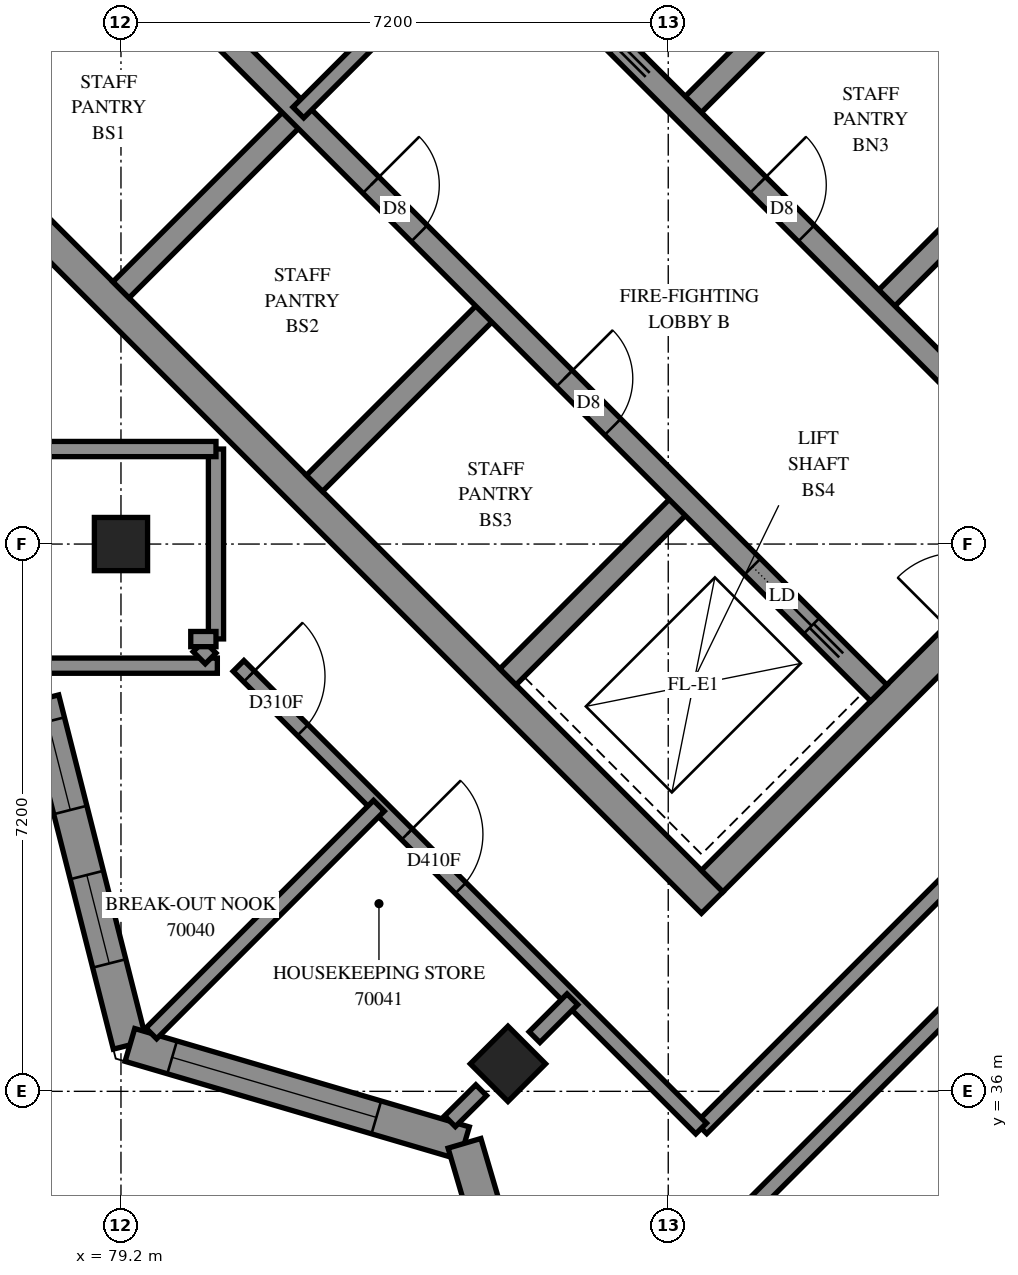
"""IFC4 building model, lengths in metres.
Left out: names, types, materials, properties, quantities, classifications, styles, units other than length and angle.
Written with IfcOpenShell. Run it as: python <this file> out.ifc"""

import sys

from ifc_helpers import new_model, si_unit, direction, frame, frame_2d, origin, origin_2d, place, context, subcontext, project, spatial, polyline, rectangle, outline, extrude, element, fill, save


model = new_model("IFC4")
c1 = context("Model", 3, precision=1e-05, world=origin(), true_north=direction((0.0, 1.0)))
c2 = subcontext(c1, "Body", "Model", "MODEL_VIEW")
j1 = project(units=[si_unit("LENGTHUNIT", "METRE"), si_unit("PLANEANGLEUNIT", "RADIAN")], contexts=[c1])
p1 = place(None, origin())
s1 = spatial("IfcSite", under=j1, at=p1, CompositionType="ELEMENT")
p2 = place(p1, origin())
s2 = spatial("IfcBuilding", under=s1, at=p2, CompositionType="ELEMENT")
p3 = place(p2, frame((0.0, 0.0, 257.4)))
s3 = spatial("IfcBuildingStorey", under=s2, at=p3, CompositionType="ELEMENT", Elevation=257.4)
for number, where, z_axis, x_axis in (
    (1, (79.2, 43.2, 0.0), (0.0, 0.0, 1.0), (1.0, 0.0, 0.0)),
    (2, (84.291, 36.362, 0.0), (0.0, 0.0, 1.0), (0.707, -0.707, 0.0)),
):
    element("IfcColumn", number, at=place(p3, frame(where, z_axis=z_axis, x_axis=x_axis)), inside=s3, PredefinedType="COLUMN", context=c2, shape_type="SweptSolid", body=[
        extrude(rectangle(XDim=0.7, YDim=0.7, at=origin_2d()), origin(), (0.0, 0.0, 1.0), 3.1),
    ])
p4 = place(p3, frame((76.23, 49.231, -0.3), z_axis=(0.0, 0.0, 1.0), x_axis=(0.7071034917, -0.7071100706, 0.0)))
e3 = element("IfcWall", 3, at=p4, inside=s3, PredefinedType="SHEAR", context=c2, shape_type="SweptSolid", body=[
    extrude(rectangle(XDim=15.2, YDim=0.4, at=frame_2d((7.6, 0.0))), origin(), (0.0, 0.0, 1.0), 2.7),
])
p5 = place(p3, frame((86.695, 59.696, -0.3), z_axis=(0.0, 0.0, 1.0), x_axis=(0.7071100706, -0.7071034917, 0.0)))
e4 = element("IfcWall", 4, at=p5, inside=s3, PredefinedType="SHEAR", context=c2, shape_type="SweptSolid", body=[
    extrude(rectangle(XDim=15.2, YDim=0.4, at=frame_2d((7.6, 0.0))), origin(), (0.0, 0.0, 1.0), 2.7),
])
p6 = place(p5, frame((10.4, 0.0, 0.3)))
e5 = element("IfcOpeningElement", 5, at=p6, cuts=e4, PredefinedType="OPENING", context=c2, shape_type="SweptSolid", body=[
    extrude(rectangle(XDim=0.8, YDim=2.1, at=frame_2d((0.4, 1.05))), frame((0.0, 0.21, 0.0), z_axis=(0.0, -1.0, 0.0), x_axis=(1.0, 0.0, 0.0)), (0.0, 0.0, 1.0), 0.42),
])
p7 = place(p3, frame((76.513, 49.231, -0.3), z_axis=(0.0, 0.0, 1.0), x_axis=(0.7071067812, 0.7071067812, 0.0)))
e6 = element("IfcWall", 6, at=p7, inside=s3, PredefinedType="SHEAR", context=c2, shape_type="SweptSolid", body=[
    extrude(rectangle(XDim=14.4, YDim=0.4, at=frame_2d((7.2, 0.0))), origin(), (0.0, 0.0, 1.0), 2.7),
])
p8 = place(p7, frame((4.55, 0.0, 0.3)))
e7 = element("IfcOpeningElement", 7, at=p8, cuts=e6, PredefinedType="OPENING", context=c2, shape_type="SweptSolid", body=[
    extrude(rectangle(XDim=1.1, YDim=2.1, at=frame_2d((0.55, 1.05))), frame((0.0, 0.21, 0.0), z_axis=(0.0, -1.0, 0.0), x_axis=(1.0, 0.0, 0.0)), (0.0, 0.0, 1.0), 0.42),
])
p9 = place(p7, frame((11.35, 0.0, 0.3)))
e8 = element("IfcOpeningElement", 8, at=p9, cuts=e6, PredefinedType="OPENING", context=c2, shape_type="SweptSolid", body=[
    extrude(rectangle(XDim=1.1, YDim=2.1, at=frame_2d((0.55, 1.05))), frame((0.0, 0.21, 0.0), z_axis=(0.0, -1.0, 0.0), x_axis=(1.0, 0.0, 0.0)), (0.0, 0.0, 1.0), 0.42),
])
p10 = place(p3, frame((86.978, 38.766, -0.3), z_axis=(0.0, 0.0, 1.0), x_axis=(0.7071067812, 0.7071067812, 0.0)))
e9 = element("IfcWall", 9, at=p10, inside=s3, PredefinedType="SHEAR", context=c2, shape_type="SweptSolid", body=[
    extrude(rectangle(XDim=14.4, YDim=0.4, at=frame_2d((7.2, 0.0))), origin(), (0.0, 0.0, 1.0), 2.7),
])
p11 = place(p10, frame((4.55, 0.0, 0.3)))
e10 = element("IfcOpeningElement", 10, at=p11, cuts=e9, PredefinedType="OPENING", context=c2, shape_type="SweptSolid", body=[
    extrude(rectangle(XDim=1.1, YDim=2.1, at=frame_2d((0.55, 1.05))), frame((0.0, 0.21, 0.0), z_axis=(0.0, -1.0, 0.0), x_axis=(1.0, 0.0, 0.0)), (0.0, 0.0, 1.0), 0.42),
])
p12 = place(p10, frame((11.35, 0.0, 0.3)))
e11 = element("IfcOpeningElement", 11, at=p12, cuts=e9, PredefinedType="OPENING", context=c2, shape_type="SweptSolid", body=[
    extrude(rectangle(XDim=1.1, YDim=2.1, at=frame_2d((0.55, 1.05))), frame((0.0, 0.21, 0.0), z_axis=(0.0, -1.0, 0.0), x_axis=(1.0, 0.0, 0.0)), (0.0, 0.0, 1.0), 0.42),
])
p13 = place(p3, frame((79.2, 46.544, 0.0), z_axis=(0.0, 0.0, 1.0), x_axis=(0.7071219326, 0.7070916295, 0.0)))
e12 = element("IfcWall", 12, at=p13, inside=s3, PredefinedType="SOLIDWALL", context=c2, shape_type="SweptSolid", body=[
    extrude(rectangle(XDim=3.3, YDim=0.3, at=frame_2d((1.65, 0.0))), origin(), (0.0, 0.0, 1.0), 3.1),
])
p14 = place(p3, frame((81.746, 43.999, 0.0), z_axis=(0.0, 0.0, 1.0), x_axis=(0.7071067812, 0.7071067812, 0.0)))
e13 = element("IfcWall", 13, at=p14, inside=s3, PredefinedType="SOLIDWALL", context=c2, shape_type="SweptSolid", body=[
    extrude(rectangle(XDim=3.3, YDim=0.3, at=frame_2d((1.65, 0.0))), origin(), (0.0, 0.0, 1.0), 3.1),
])
p15 = place(p3, frame((86.625, 48.878, 0.0), z_axis=(0.0, 0.0, 1.0), x_axis=(0.7071067812, 0.7071067812, 0.0)))
e14 = element("IfcWall", 14, at=p15, inside=s3, PredefinedType="SOLIDWALL", context=c2, shape_type="SweptSolid", body=[
    extrude(rectangle(XDim=3.3, YDim=0.3, at=frame_2d((1.65, 0.0))), origin(), (0.0, 0.0, 1.0), 3.1),
])
p16 = place(p3, frame((84.291, 41.453, 0.0), z_axis=(0.0, 0.0, 1.0), x_axis=(0.7071067812, 0.7071067812, 0.0)))
e15 = element("IfcWall", 15, at=p16, inside=s3, PredefinedType="SOLIDWALL", context=c2, shape_type="SweptSolid", body=[
    extrude(rectangle(XDim=3.3, YDim=0.3, at=frame_2d((1.65, 0.0))), origin(), (0.0, 0.0, 1.0), 3.1),
])
p17 = place(p3, frame((89.17, 46.332, 0.0), z_axis=(0.0, 0.0, 1.0), x_axis=(0.7071067812, 0.7071067812, 0.0)))
e16 = element("IfcWall", 16, at=p17, inside=s3, PredefinedType="SOLIDWALL", context=c2, shape_type="SweptSolid", body=[
    extrude(rectangle(XDim=3.3, YDim=0.3, at=frame_2d((1.65, 0.0))), origin(), (0.0, 0.0, 1.0), 3.1),
])
p18 = place(p3, frame((78.988, 51.423, 0.0), z_axis=(0.0, 0.0, 1.0), x_axis=(0.7071067812, -0.7071067812, 0.0)))
e17 = element("IfcWall", 17, at=p18, inside=s3, PredefinedType="SOLIDWALL", context=c2, shape_type="SweptSolid", body=[
    extrude(rectangle(XDim=14.4, YDim=0.3, at=frame_2d((7.2, 0.0))), origin(), (0.0, 0.0, 1.0), 3.1),
])
p19 = place(p18, frame((1.35, 0.0, 0.0)))
e18 = element("IfcOpeningElement", 18, at=p19, cuts=e17, PredefinedType="OPENING", context=c2, shape_type="SweptSolid", body=[
    extrude(rectangle(XDim=0.9, YDim=2.1, at=frame_2d((0.45, 1.05))), frame((0.0, 0.16, 0.0), z_axis=(0.0, -1.0, 0.0), x_axis=(1.0, 0.0, 0.0)), (0.0, 0.0, 1.0), 0.32),
])
p20 = place(p18, frame((4.95, 0.0, 0.0)))
e19 = element("IfcOpeningElement", 19, at=p20, cuts=e17, PredefinedType="OPENING", context=c2, shape_type="SweptSolid", body=[
    extrude(rectangle(XDim=0.9, YDim=2.1, at=frame_2d((0.45, 1.05))), frame((0.0, 0.16, 0.0), z_axis=(0.0, -1.0, 0.0), x_axis=(1.0, 0.0, 0.0)), (0.0, 0.0, 1.0), 0.32),
])
p21 = place(p18, frame((8.55, 0.0, 0.0)))
e20 = element("IfcOpeningElement", 20, at=p21, cuts=e17, PredefinedType="OPENING", context=c2, shape_type="SweptSolid", body=[
    extrude(rectangle(XDim=0.9, YDim=2.1, at=frame_2d((0.45, 1.05))), frame((0.0, 0.16, 0.0), z_axis=(0.0, -1.0, 0.0), x_axis=(1.0, 0.0, 0.0)), (0.0, 0.0, 1.0), 0.32),
])
p22 = place(p18, frame((12.05, 0.0, 0.0)))
e21 = element("IfcOpeningElement", 21, at=p22, cuts=e17, PredefinedType="OPENING", context=c2, shape_type="SweptSolid", body=[
    extrude(rectangle(XDim=1.1, YDim=2.1, at=frame_2d((0.55, 1.05))), frame((0.0, 0.16, 0.0), z_axis=(0.0, -1.0, 0.0), x_axis=(1.0, 0.0, 0.0)), (0.0, 0.0, 1.0), 0.32),
])
p23 = place(p3, frame((81.534, 53.969, 0.0), z_axis=(0.0, 0.0, 1.0), x_axis=(0.707103309, -0.7071102534, 0.0)))
e22 = element("IfcWall", 22, at=p23, inside=s3, PredefinedType="SOLIDWALL", context=c2, shape_type="SweptSolid", body=[
    extrude(rectangle(XDim=14.4, YDim=0.3, at=frame_2d((7.2, 0.0))), origin(), (0.0, 0.0, 1.0), 3.1),
])
p24 = place(p23, frame((8.55, 0.0, 0.0)))
e23 = element("IfcOpeningElement", 23, at=p24, cuts=e22, PredefinedType="OPENING", context=c2, shape_type="SweptSolid", body=[
    extrude(rectangle(XDim=0.9, YDim=2.1, at=frame_2d((0.45, 1.05))), frame((0.0, 0.16, 0.0), z_axis=(0.0, -1.0, 0.0), x_axis=(1.0, 0.0, 0.0)), (0.0, 0.0, 1.0), 0.32),
])
p25 = place(p23, frame((1.25, 0.0, 0.0)))
e24 = element("IfcOpeningElement", 24, at=p25, cuts=e22, PredefinedType="OPENING", context=c2, shape_type="SweptSolid", body=[
    extrude(rectangle(XDim=1.1, YDim=2.1, at=frame_2d((0.55, 1.05))), frame((0.0, 0.16, 0.0), z_axis=(0.0, -1.0, 0.0), x_axis=(1.0, 0.0, 0.0)), (0.0, 0.0, 1.0), 0.32),
])
p26 = place(p23, frame((4.85, 0.0, 0.0)))
e25 = element("IfcOpeningElement", 25, at=p26, cuts=e22, PredefinedType="OPENING", context=c2, shape_type="SweptSolid", body=[
    extrude(rectangle(XDim=1.1, YDim=2.1, at=frame_2d((0.55, 1.05))), frame((0.0, 0.16, 0.0), z_axis=(0.0, -1.0, 0.0), x_axis=(1.0, 0.0, 0.0)), (0.0, 0.0, 1.0), 0.32),
])
p27 = place(p23, frame((12.05, 0.0, 0.0)))
e26 = element("IfcOpeningElement", 26, at=p27, cuts=e22, PredefinedType="OPENING", context=c2, shape_type="SweptSolid", body=[
    extrude(rectangle(XDim=1.1, YDim=2.1, at=frame_2d((0.55, 1.05))), frame((0.0, 0.16, 0.0), z_axis=(0.0, -1.0, 0.0), x_axis=(1.0, 0.0, 0.0)), (0.0, 0.0, 1.0), 0.32),
])
p28 = place(p3, frame((88.958, 51.211, 0.0), z_axis=(0.0, 0.0, 1.0), x_axis=(0.7070998367, -0.7071137256, 0.0)))
e27 = element("IfcWall", 27, at=p28, inside=s3, PredefinedType="SOLIDWALL", context=c2, shape_type="SweptSolid", body=[
    extrude(rectangle(XDim=7.2, YDim=0.3, at=frame_2d((3.6, 0.0))), origin(), (0.0, 0.0, 1.0), 3.1),
])
p29 = place(p3, frame((74.398, 42.229, 0.0), z_axis=(0.0, 0.0, 1.0), x_axis=(0.961995937, -0.2730637604, 0.0)))
e28 = element("IfcWall", 28, at=p29, inside=s3, PredefinedType="SOLIDWALL", context=c2, shape_type="SweptSolid", body=[
    extrude(outline(polyline([(0.045, -0.225), (3.784, -0.225), (4.043, 0.225), (-0.045, 0.225), (0.045, -0.225)])), origin(), (0.0, 0.0, 1.0), 3.1),
])
p30 = place(p3, frame((78.163, 41.16, 0.0), z_axis=(0.0, 0.0, 1.0), x_axis=(0.2459778521, -0.9692754491, 0.0)))
e29 = element("IfcWall", 29, at=p30, inside=s3, PredefinedType="SOLIDWALL", context=c2, shape_type="SweptSolid", body=[
    extrude(outline(polyline([(0.13, -0.225), (4.822, -0.225), (4.566, 0.225), (-0.13, 0.225), (0.13, -0.225)])), origin(), (0.0, 0.0, 1.0), 3.1),
])
p31 = place(p30, frame((0.305, 0.0, 0.45)))
e30 = element("IfcOpeningElement", 30, at=p31, cuts=e29, PredefinedType="OPENING", context=c2, shape_type="SweptSolid", body=[
    extrude(rectangle(XDim=1.2, YDim=2.55, at=frame_2d((0.6, 1.275))), frame((0.0, 0.235, 0.0), z_axis=(0.0, -1.0, 0.0), x_axis=(1.0, 0.0, 0.0)), (0.0, 0.0, 1.0), 0.47),
])
p32 = place(p30, frame((2.388, 0.0, 0.45)))
e31 = element("IfcOpeningElement", 31, at=p32, cuts=e29, PredefinedType="OPENING", context=c2, shape_type="SweptSolid", body=[
    extrude(rectangle(XDim=1.2, YDim=2.55, at=frame_2d((0.6, 1.275))), frame((0.0, 0.235, 0.0), z_axis=(0.0, -1.0, 0.0), x_axis=(1.0, 0.0, 0.0)), (0.0, 0.0, 1.0), 0.47),
])
p33 = place(p3, frame((79.318, 36.61, 0.0), z_axis=(0.0, 0.0, 1.0), x_axis=(0.9593901398, -0.2820825406, 0.0)))
e32 = element("IfcWall", 32, at=p33, inside=s3, PredefinedType="SOLIDWALL", context=c2, shape_type="SweptSolid", body=[
    extrude(outline(polyline([(-0.128, -0.225), (4.465, -0.225), (4.711, 0.225), (0.128, 0.225), (-0.128, -0.225)])), origin(), (0.0, 0.0, 1.0), 3.1),
])
p34 = place(p33, frame((0.579, 0.0, 0.45)))
e33 = element("IfcOpeningElement", 33, at=p34, cuts=e32, PredefinedType="OPENING", context=c2, shape_type="SweptSolid", body=[
    extrude(rectangle(XDim=2.8, YDim=2.55, at=frame_2d((1.4, 1.275))), frame((0.0, 0.235, 0.0), z_axis=(0.0, -1.0, 0.0), x_axis=(1.0, 0.0, 0.0)), (0.0, 0.0, 1.0), 0.47),
])
p35 = place(p3, frame((83.719, 35.316, 0.0), z_axis=(0.0, 0.0, 1.0), x_axis=(0.2820825406, -0.9593901398, 0.0)))
e34 = element("IfcWall", 34, at=p35, inside=s3, PredefinedType="SOLIDWALL", context=c2, shape_type="SweptSolid", body=[
    extrude(outline(polyline([(0.123, -0.225), (4.716, -0.225), (4.46, 0.225), (-0.123, 0.225), (0.123, -0.225)])), origin(), (0.0, 0.0, 1.0), 3.1),
])
p36 = place(p35, frame((1.02, 0.0, 0.45)))
e35 = element("IfcOpeningElement", 35, at=p36, cuts=e34, PredefinedType="OPENING", context=c2, shape_type="SweptSolid", body=[
    extrude(rectangle(XDim=1.2, YDim=2.55, at=frame_2d((0.6, 1.275))), frame((0.0, 0.235, 0.0), z_axis=(0.0, -1.0, 0.0), x_axis=(1.0, 0.0, 0.0)), (0.0, 0.0, 1.0), 0.47),
])
p37 = place(p3, frame((81.534, 48.878, 0.0), z_axis=(0.0, 0.0, 1.0), x_axis=(0.707092892, 0.7071206701, 0.0)))
e36 = element("IfcWall", 36, at=p37, inside=s3, PredefinedType="PARTITIONING", context=c2, shape_type="SweptSolid", body=[
    extrude(rectangle(XDim=3.6, YDim=0.2, at=frame_2d((1.8, 0.0))), origin(), (0.0, 0.0, 1.0), 3.1),
])
p38 = place(p3, frame((84.949, 31.932, 0.0), z_axis=(0.0, 0.0, 1.0), x_axis=(0.7071768688, 0.7070366866, 0.0)))
e37 = element("IfcWall", 37, at=p38, inside=s3, PredefinedType="PARTITIONING", context=c2, shape_type="SweptSolid", body=[
    extrude(rectangle(XDim=14.267, YDim=0.2, at=frame_2d((7.134, 0.0))), origin(), (0.0, 0.0, 1.0), 3.1),
])
p39 = place(p3, frame((86.836, 35.514, 0.0), z_axis=(0.0, 0.0, 1.0), x_axis=(0.7071067812, 0.7071067812, 0.0)))
e38 = element("IfcWall", 38, at=p39, inside=s3, PredefinedType="PARTITIONING", context=c2, shape_type="SweptSolid", body=[
    extrude(rectangle(XDim=10.4, YDim=0.2, at=frame_2d((5.2, 0.0))), origin(), (0.0, 0.0, 1.0), 3.1),
])
p40 = place(p39, frame((9.207, 0.0, 0.0)))
e39 = element("IfcOpeningElement", 39, at=p40, cuts=e38, PredefinedType="OPENING", context=c2, shape_type="SweptSolid", body=[
    extrude(rectangle(XDim=1.0, YDim=2.1, at=frame_2d((0.5, 1.05))), frame((0.0, 0.11, 0.0), z_axis=(0.0, -1.0, 0.0), x_axis=(1.0, 0.0, 0.0)), (0.0, 0.0, 1.0), 0.22),
])
p41 = place(p3, frame((80.747, 41.597, 0.0), z_axis=(0.0, 0.0, 1.0), x_axis=(0.7071067812, -0.7071067812, 0.0)))
e40 = element("IfcWall", 40, at=p41, inside=s3, PredefinedType="PARTITIONING", context=c2, shape_type="SweptSolid", body=[
    extrude(rectangle(XDim=8.607, YDim=0.2, at=frame_2d((4.303, 0.0))), origin(), (0.0, 0.0, 1.0), 3.1),
])
p42 = place(p41, frame((0.195, 0.0, 0.0)))
e41 = element("IfcOpeningElement", 41, at=p42, cuts=e40, PredefinedType="OPENING", context=c2, shape_type="SweptSolid", body=[
    extrude(rectangle(XDim=1.0, YDim=2.1, at=frame_2d((0.5, 1.05))), frame((0.0, 0.11, 0.0), z_axis=(0.0, -1.0, 0.0), x_axis=(1.0, 0.0, 0.0)), (0.0, 0.0, 1.0), 0.22),
])
p43 = place(p41, frame((3.133, 0.0, 0.0)))
e42 = element("IfcOpeningElement", 42, at=p43, cuts=e40, PredefinedType="OPENING", context=c2, shape_type="SweptSolid", body=[
    extrude(rectangle(XDim=1.0, YDim=2.1, at=frame_2d((0.5, 1.05))), frame((0.0, 0.11, 0.0), z_axis=(0.0, -1.0, 0.0), x_axis=(1.0, 0.0, 0.0)), (0.0, 0.0, 1.0), 0.22),
])
p44 = place(p3, frame((89.731, 31.621, 0.0), z_axis=(0.0, 0.0, 1.0), x_axis=(0.7071067812, 0.7071067812, 0.0)))
e43 = element("IfcWall", 43, at=p44, inside=s3, PredefinedType="PARTITIONING", context=c2, shape_type="SweptSolid", body=[
    extrude(rectangle(XDim=6.211, YDim=0.2, at=frame_2d((3.106, 0.0))), origin(), (0.0, 0.0, 1.0), 2.6),
])
p45 = place(p3, frame((79.599, 36.762, 0.0), z_axis=(0.0, 0.0, 1.0), x_axis=(0.7071185876, 0.7070949745, 0.0)))
e44 = element("IfcWall", 44, at=p45, inside=s3, PredefinedType="PARTITIONING", context=c2, shape_type="SweptSolid", body=[
    extrude(rectangle(XDim=4.235, YDim=0.2, at=frame_2d((2.117, 0.0))), origin(), (0.0, 0.0, 1.0), 3.1),
])
p46 = place(p3, frame((77.487, 41.6, 0.0), z_axis=(0.0, 0.0, 1.0), x_axis=(1.0, 0.0, 0.0)))
e45 = element("IfcWall", 45, at=p46, inside=s3, PredefinedType="PARTITIONING", context=c2, shape_type="SweptSolid", body=[
    extrude(rectangle(XDim=2.981, YDim=0.2, at=frame_2d((1.49, 0.0))), origin(), (0.0, 0.0, 1.0), 3.1),
])
for number, where, z_axis, x_axis in (
    (46, (80.45, 41.952, 0.0), (0.0, 0.0, 1.0), (0.0, 1.0, 0.0)),
    (47, (77.952, 44.45, 0.0), (0.0, 0.0, 1.0), (1.0, 0.0, 0.0)),
):
    element("IfcWall", number, at=place(p3, frame(where, z_axis=z_axis, x_axis=x_axis)), inside=s3, PredefinedType="PARTITIONING", context=c2, shape_type="SweptSolid", body=[
        extrude(rectangle(XDim=2.498, YDim=0.2, at=frame_2d((1.249, 0.0))), origin(), (0.0, 0.0, 1.0), 3.1),
    ])
p47 = place(p3, frame((84.641, 36.713, 0.0), z_axis=(0.0, 0.0, 1.0), x_axis=(0.7071067812, 0.7071067812, 0.0)))
e48 = element("IfcWall", 48, at=p47, inside=s3, PredefinedType="PARTITIONING", context=c2, shape_type="SweptSolid", body=[
    extrude(rectangle(XDim=0.704, YDim=0.2, at=frame_2d((0.352, 0.0))), origin(), (0.0, 0.0, 1.0), 3.1),
])
p48 = place(p3, frame((83.528, 35.607, 0.0), z_axis=(0.0, 0.0, 1.0), x_axis=(0.7090904806, 0.7051175011, 0.0)))
e49 = element("IfcWall", 49, at=p48, inside=s3, PredefinedType="PARTITIONING", context=c2, shape_type="SweptSolid", body=[
    extrude(rectangle(XDim=0.579, YDim=0.2, at=frame_2d((0.289, 0.0))), origin(), (0.0, 0.0, 1.0), 3.1),
])
p49 = place(p3, frame((80.221, 41.855, 0.0), z_axis=(0.0, 0.0, 1.0), x_axis=(0.7068844555, -0.707329037, 0.0)))
e50 = element("IfcWall", 50, at=p49, inside=s3, PredefinedType="PARTITIONING", context=c2, shape_type="SweptSolid", body=[
    extrude(rectangle(XDim=0.225, YDim=0.2, at=frame_2d((0.112, 0.0))), origin(), (0.0, 0.0, 1.0), 3.1),
])
p50 = place(p3, frame((80.118, 41.95, 0.0), z_axis=(0.0, 0.0, 1.0), x_axis=(1.0, 0.0, 0.0)))
e51 = element("IfcWall", 51, at=p50, inside=s3, PredefinedType="PARTITIONING", context=c2, shape_type="SweptSolid", body=[
    extrude(rectangle(XDim=0.332, YDim=0.2, at=frame_2d((0.166, 0.0))), origin(), (0.0, 0.0, 1.0), 3.1),
])
p51 = place(p31, origin())
e52 = element("IfcWindow", 52, at=p51, inside=s3, PartitioningType="SINGLE_PANEL", PredefinedType="WINDOW", context=c2, shape_type="SweptSolid", body=[
    extrude(rectangle(XDim=1.2, YDim=2.55, at=frame_2d((0.6, 1.275))), frame((0.0, 0.205, 0.0), z_axis=(0.0, -1.0, 0.0), x_axis=(1.0, 0.0, 0.0)), (0.0, 0.0, 1.0), 0.06),
])
fill(e30, e52)
p52 = place(p32, origin())
e53 = element("IfcWindow", 53, at=p52, inside=s3, PartitioningType="SINGLE_PANEL", PredefinedType="WINDOW", context=c2, shape_type="SweptSolid", body=[
    extrude(rectangle(XDim=1.2, YDim=2.55, at=frame_2d((0.6, 1.275))), frame((0.0, 0.205, 0.0), z_axis=(0.0, -1.0, 0.0), x_axis=(1.0, 0.0, 0.0)), (0.0, 0.0, 1.0), 0.06),
])
fill(e31, e53)
p53 = place(p34, origin())
e54 = element("IfcWindow", 54, at=p53, inside=s3, PartitioningType="SINGLE_PANEL", PredefinedType="WINDOW", context=c2, shape_type="SweptSolid", body=[
    extrude(rectangle(XDim=2.8, YDim=2.55, at=frame_2d((1.4, 1.275))), frame((0.0, 0.205, 0.0), z_axis=(0.0, -1.0, 0.0), x_axis=(1.0, 0.0, 0.0)), (0.0, 0.0, 1.0), 0.06),
])
fill(e33, e54)
p54 = place(p20, origin())
e55 = element("IfcDoor", 55, at=p54, inside=s3, OperationType="SINGLE_SWING_LEFT", PredefinedType="DOOR", context=c2, shape_type="SweptSolid", body=[
    extrude(rectangle(XDim=0.9, YDim=2.1, at=frame_2d((0.45, 1.05))), frame((0.0, 0.025, 0.0), z_axis=(0.0, -1.0, 0.0), x_axis=(1.0, 0.0, 0.0)), (0.0, 0.0, 1.0), 0.05),
])
fill(e19, e55)
p55 = place(p21, origin())
e56 = element("IfcDoor", 56, at=p55, inside=s3, OperationType="SINGLE_SWING_LEFT", PredefinedType="DOOR", context=c2, shape_type="SweptSolid", body=[
    extrude(rectangle(XDim=0.9, YDim=2.1, at=frame_2d((0.45, 1.05))), frame((0.0, 0.025, 0.0), z_axis=(0.0, -1.0, 0.0), x_axis=(1.0, 0.0, 0.0)), (0.0, 0.0, 1.0), 0.05),
])
fill(e20, e56)
p56 = place(p24, origin())
e57 = element("IfcDoor", 57, at=p56, inside=s3, OperationType="SINGLE_SWING_LEFT", PredefinedType="DOOR", context=c2, shape_type="SweptSolid", body=[
    extrude(rectangle(XDim=0.9, YDim=2.1, at=frame_2d((0.45, 1.05))), frame((0.0, 0.025, 0.0), z_axis=(0.0, -1.0, 0.0), x_axis=(1.0, 0.0, 0.0)), (0.0, 0.0, 1.0), 0.05),
])
fill(e23, e57)
p57 = place(p22, origin())
e58 = element("IfcDoor", 58, at=p57, inside=s3, OperationType="SLIDING_TO_RIGHT", PredefinedType="DOOR", context=c2, shape_type="SweptSolid", body=[
    extrude(rectangle(XDim=1.1, YDim=2.1, at=frame_2d((0.55, 1.05))), frame((0.0, 0.025, 0.0), z_axis=(0.0, -1.0, 0.0), x_axis=(1.0, 0.0, 0.0)), (0.0, 0.0, 1.0), 0.05),
])
fill(e21, e58)
p58 = place(p42, origin())
e59 = element("IfcDoor", 59, at=p58, inside=s3, OperationType="SINGLE_SWING_LEFT", PredefinedType="DOOR", context=c2, shape_type="SweptSolid", body=[
    extrude(rectangle(XDim=1.0, YDim=2.1, at=frame_2d((0.5, 1.05))), frame((0.0, 0.025, 0.0), z_axis=(0.0, -1.0, 0.0), x_axis=(1.0, 0.0, 0.0)), (0.0, 0.0, 1.0), 0.05),
])
fill(e41, e59)
p59 = place(p43, origin())
e60 = element("IfcDoor", 60, at=p59, inside=s3, OperationType="SINGLE_SWING_LEFT", PredefinedType="DOOR", context=c2, shape_type="SweptSolid", body=[
    extrude(rectangle(XDim=1.0, YDim=2.1, at=frame_2d((0.5, 1.05))), frame((0.0, 0.025, 0.0), z_axis=(0.0, -1.0, 0.0), x_axis=(1.0, 0.0, 0.0)), (0.0, 0.0, 1.0), 0.05),
])
fill(e42, e60)
save(model, sys.argv[1])
